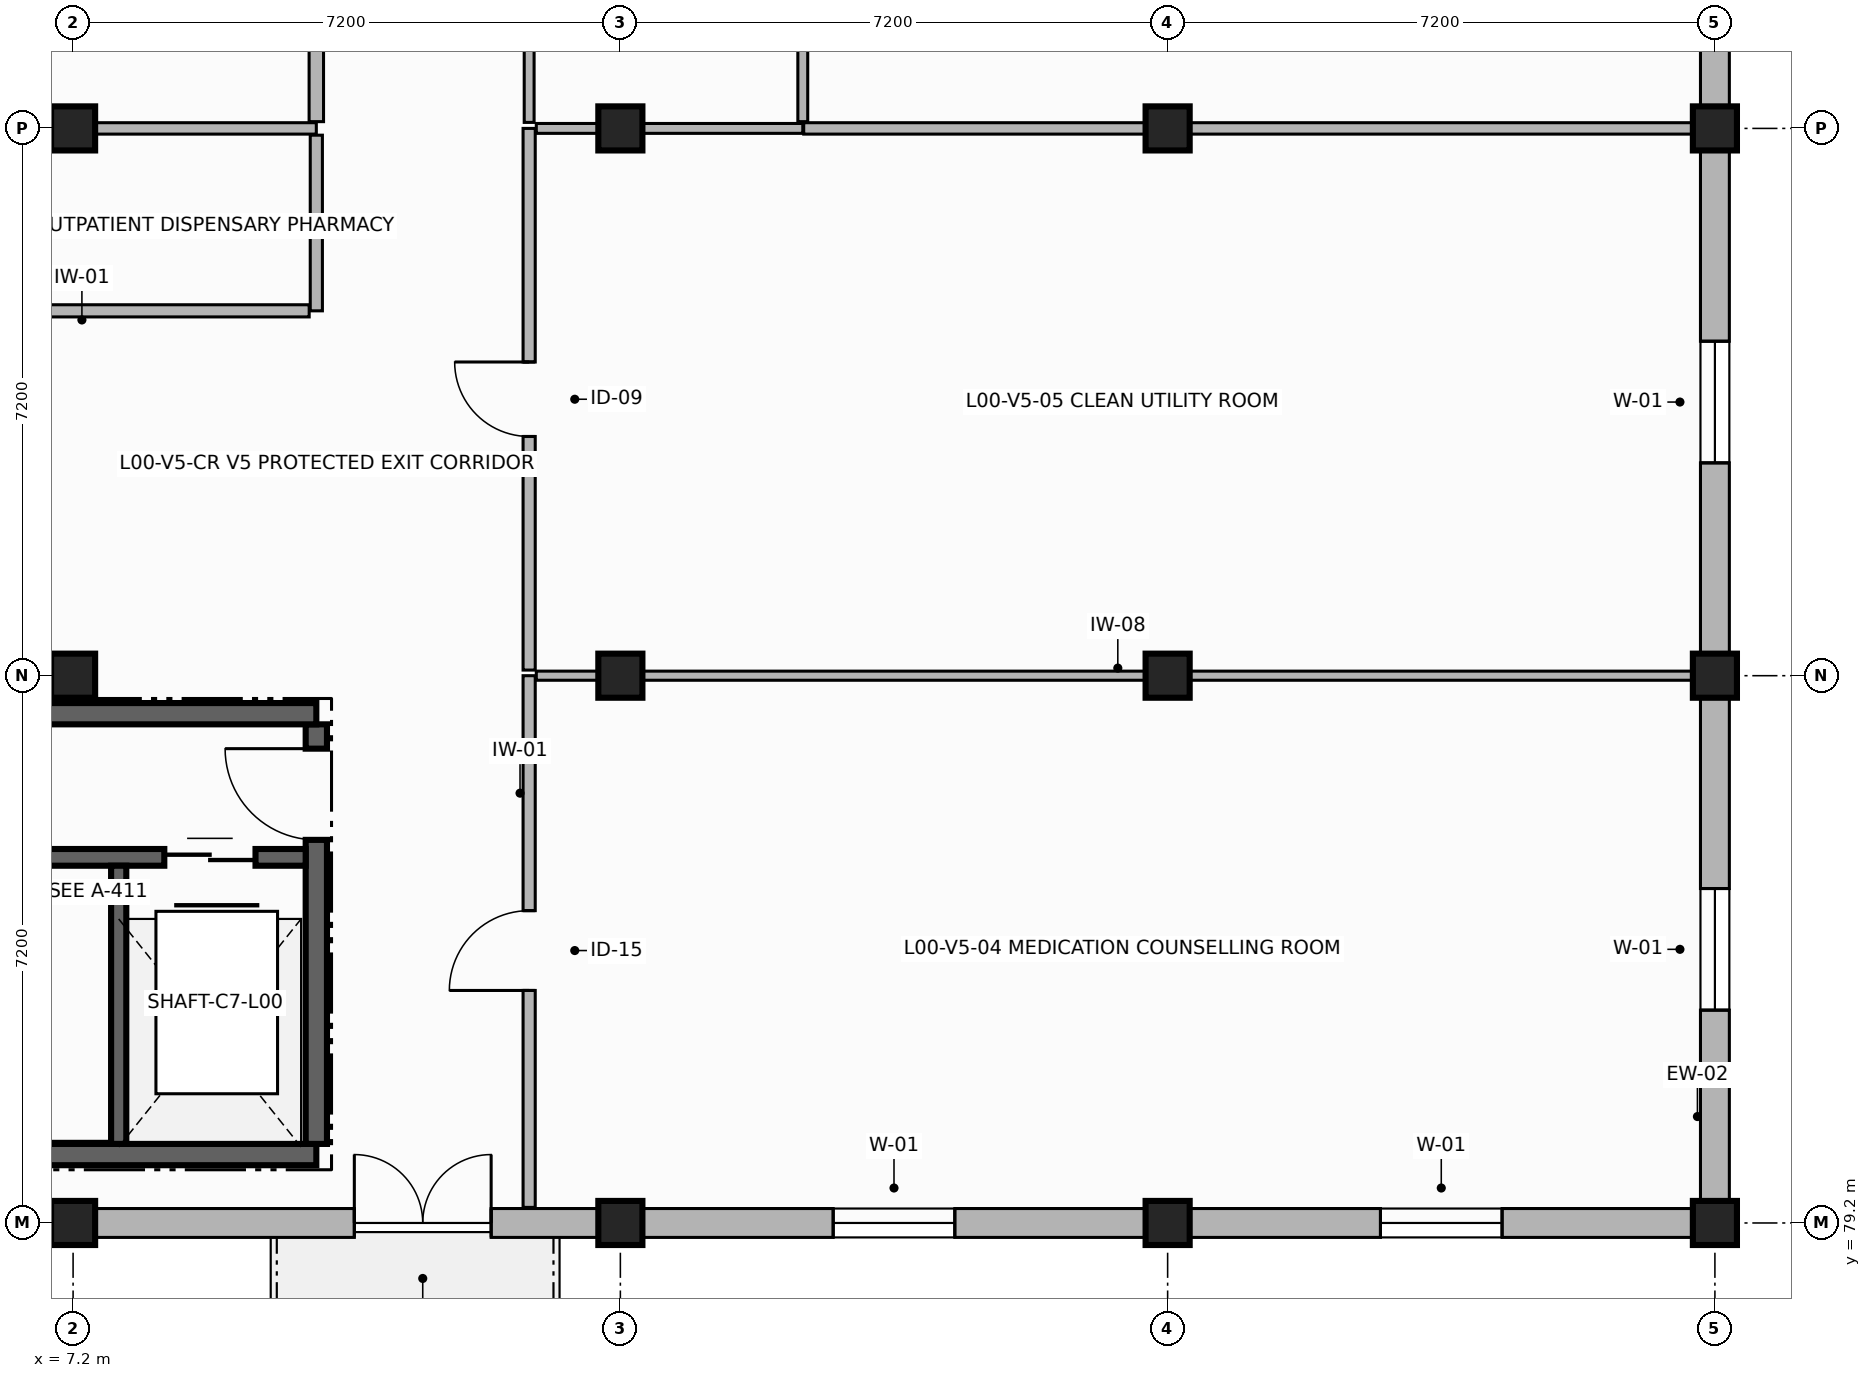
"""IFC4 building model, lengths in metres.
Left out: names, types, materials, properties, quantities, classifications, styles, units other than length and angle.
Written with IfcOpenShell. Run it as: python <this file> out.ifc"""

import sys

from ifc_helpers import new_model, si_unit, direction, frame, frame_2d, origin, origin_2d, place, context, subcontext, project, spatial, rectangle, extrude, element, fill, save


model = new_model("IFC4")
c1 = context("Model", 3, precision=1e-05, world=origin(), true_north=direction((0.0, 1.0)))
c2 = subcontext(c1, "Body", "Model", "MODEL_VIEW")
j1 = project(units=[si_unit("LENGTHUNIT", "METRE"), si_unit("PLANEANGLEUNIT", "RADIAN")], contexts=[c1])
p1 = place(None, origin())
s1 = spatial("IfcSite", under=j1, at=p1, CompositionType="ELEMENT")
p2 = place(p1, origin())
s2 = spatial("IfcBuilding", under=s1, at=p2, CompositionType="ELEMENT")
p3 = place(p2, origin())
s3 = spatial("IfcBuildingStorey", under=s2, at=p3, CompositionType="ELEMENT", Elevation=0.0)
for number, where, z_axis, x_axis in (
    (1, (7.2, 79.2, -0.38), (0.0, 0.0, 1.0), (1.0, 0.0, 0.0)),
    (2, (7.2, 86.4, -0.38), (0.0, 0.0, 1.0), (1.0, 0.0, 0.0)),
    (3, (7.2, 93.6, -0.38), (0.0, 0.0, 1.0), (1.0, 0.0, 0.0)),
    (4, (14.4, 79.2, -0.38), (0.0, 0.0, 1.0), (1.0, 0.0, 0.0)),
    (5, (14.4, 86.4, -0.38), (0.0, 0.0, 1.0), (1.0, 0.0, 0.0)),
    (6, (14.4, 93.6, -0.38), (0.0, 0.0, 1.0), (1.0, 0.0, 0.0)),
    (7, (21.6, 79.2, -0.38), (0.0, 0.0, 1.0), (1.0, 0.0, 0.0)),
    (8, (21.6, 86.4, -0.38), (0.0, 0.0, 1.0), (1.0, 0.0, 0.0)),
    (9, (21.6, 93.6, -0.38), (0.0, 0.0, 1.0), (1.0, 0.0, 0.0)),
    (10, (28.8, 79.2, -0.38), (0.0, 0.0, 1.0), (1.0, 0.0, 0.0)),
    (11, (28.8, 86.4, -0.38), (0.0, 0.0, 1.0), (1.0, 0.0, 0.0)),
    (12, (28.8, 93.6, -0.38), (0.0, 0.0, 1.0), (1.0, 0.0, 0.0)),
):
    element("IfcColumn", number, at=place(p3, frame(where, z_axis=z_axis, x_axis=x_axis)), inside=s3, PredefinedType="COLUMN", context=c2, shape_type="SweptSolid", body=[
        extrude(rectangle(XDim=0.58, YDim=0.58, at=origin_2d()), origin(), (0.0, 0.0, 1.0), 4.57),
    ])
p4 = place(p3, frame((0.0, 79.2, 0.0), z_axis=(0.0, 0.0, 1.0), x_axis=(1.0, 0.0, 0.0)))
e13 = element("IfcWall", 13, at=p4, inside=s3, PredefinedType="SOLIDWALL", context=c2, shape_type="SweptSolid", body=[
    extrude(rectangle(XDim=7.2, YDim=0.38, at=frame_2d((3.6, 0.0))), origin(), (0.0, 0.0, 1.0), 3.52),
])
p5 = place(p4, frame((2.8, 0.0, 0.85)))
e14 = element("IfcOpeningElement", 14, at=p5, cuts=e13, PredefinedType="OPENING", context=c2, shape_type="SweptSolid", body=[
    extrude(rectangle(XDim=1.6, YDim=2.45, at=frame_2d((0.8, 1.225))), frame((0.0, 0.2, 0.0), z_axis=(0.0, -1.0, 0.0), x_axis=(1.0, 0.0, 0.0)), (0.0, 0.0, 1.0), 0.4),
])
p6 = place(p3, frame((7.2, 79.2, 0.0), z_axis=(0.0, 0.0, 1.0), x_axis=(1.0, 0.0, 0.0)))
e15 = element("IfcWall", 15, at=p6, inside=s3, PredefinedType="SOLIDWALL", context=c2, shape_type="SweptSolid", body=[
    extrude(rectangle(XDim=7.2, YDim=0.38, at=frame_2d((3.6, 0.0))), origin(), (0.0, 0.0, 1.0), 3.52),
])
p7 = place(p6, frame((3.7, 0.0, 0.0)))
e16 = element("IfcOpeningElement", 16, at=p7, cuts=e15, PredefinedType="OPENING", context=c2, shape_type="SweptSolid", body=[
    extrude(rectangle(XDim=1.8, YDim=2.4, at=frame_2d((0.9, 1.2))), frame((0.0, 0.2, 0.0), z_axis=(0.0, -1.0, 0.0), x_axis=(1.0, 0.0, 0.0)), (0.0, 0.0, 1.0), 0.4),
])
p8 = place(p3, frame((14.4, 79.2, 0.0), z_axis=(0.0, 0.0, 1.0), x_axis=(1.0, 0.0, 0.0)))
e17 = element("IfcWall", 17, at=p8, inside=s3, PredefinedType="SOLIDWALL", context=c2, shape_type="SweptSolid", body=[
    extrude(rectangle(XDim=7.2, YDim=0.38, at=frame_2d((3.6, 0.0))), origin(), (0.0, 0.0, 1.0), 3.52),
])
p9 = place(p8, frame((2.8, 0.0, 0.85)))
e18 = element("IfcOpeningElement", 18, at=p9, cuts=e17, PredefinedType="OPENING", context=c2, shape_type="SweptSolid", body=[
    extrude(rectangle(XDim=1.6, YDim=2.45, at=frame_2d((0.8, 1.225))), frame((0.0, 0.2, 0.0), z_axis=(0.0, -1.0, 0.0), x_axis=(1.0, 0.0, 0.0)), (0.0, 0.0, 1.0), 0.4),
])
p10 = place(p3, frame((21.6, 79.2, 0.0), z_axis=(0.0, 0.0, 1.0), x_axis=(1.0, 0.0, 0.0)))
e19 = element("IfcWall", 19, at=p10, inside=s3, PredefinedType="SOLIDWALL", context=c2, shape_type="SweptSolid", body=[
    extrude(rectangle(XDim=7.2, YDim=0.38, at=frame_2d((3.6, 0.0))), origin(), (0.0, 0.0, 1.0), 3.52),
])
p11 = place(p10, frame((2.8, 0.0, 0.85)))
e20 = element("IfcOpeningElement", 20, at=p11, cuts=e19, PredefinedType="OPENING", context=c2, shape_type="SweptSolid", body=[
    extrude(rectangle(XDim=1.6, YDim=2.45, at=frame_2d((0.8, 1.225))), frame((0.0, 0.2, 0.0), z_axis=(0.0, -1.0, 0.0), x_axis=(1.0, 0.0, 0.0)), (0.0, 0.0, 1.0), 0.4),
])
p12 = place(p3, frame((28.8, 79.2, 0.0), z_axis=(0.0, 0.0, 1.0), x_axis=(0.0, 1.0, 0.0)))
e21 = element("IfcWall", 21, at=p12, inside=s3, PredefinedType="SOLIDWALL", context=c2, shape_type="SweptSolid", body=[
    extrude(rectangle(XDim=7.2, YDim=0.38, at=frame_2d((3.6, 0.0))), origin(), (0.0, 0.0, 1.0), 3.52),
])
p13 = place(p12, frame((2.8, 0.0, 0.85)))
e22 = element("IfcOpeningElement", 22, at=p13, cuts=e21, PredefinedType="OPENING", context=c2, shape_type="SweptSolid", body=[
    extrude(rectangle(XDim=1.6, YDim=2.45, at=frame_2d((0.8, 1.225))), frame((0.0, 0.2, 0.0), z_axis=(0.0, -1.0, 0.0), x_axis=(1.0, 0.0, 0.0)), (0.0, 0.0, 1.0), 0.4),
])
p14 = place(p3, frame((28.8, 86.4, 0.0), z_axis=(0.0, 0.0, 1.0), x_axis=(0.0, 1.0, 0.0)))
e23 = element("IfcWall", 23, at=p14, inside=s3, PredefinedType="SOLIDWALL", context=c2, shape_type="SweptSolid", body=[
    extrude(rectangle(XDim=7.2, YDim=0.38, at=frame_2d((3.6, 0.0))), origin(), (0.0, 0.0, 1.0), 3.52),
])
p15 = place(p14, frame((2.8, 0.0, 0.85)))
e24 = element("IfcOpeningElement", 24, at=p15, cuts=e23, PredefinedType="OPENING", context=c2, shape_type="SweptSolid", body=[
    extrude(rectangle(XDim=1.6, YDim=2.45, at=frame_2d((0.8, 1.225))), frame((0.0, 0.2, 0.0), z_axis=(0.0, -1.0, 0.0), x_axis=(1.0, 0.0, 0.0)), (0.0, 0.0, 1.0), 0.4),
])
p16 = place(p3, frame((28.8, 93.6, 0.0), z_axis=(0.0, 0.0, 1.0), x_axis=(0.0, 1.0, 0.0)))
e25 = element("IfcWall", 25, at=p16, inside=s3, PredefinedType="SOLIDWALL", context=c2, shape_type="SweptSolid", body=[
    extrude(rectangle(XDim=7.2, YDim=0.38, at=frame_2d((3.6, 0.0))), origin(), (0.0, 0.0, 1.0), 3.52),
])
p17 = place(p16, frame((2.8, 0.0, 0.85)))
e26 = element("IfcOpeningElement", 26, at=p17, cuts=e25, PredefinedType="OPENING", context=c2, shape_type="SweptSolid", body=[
    extrude(rectangle(XDim=1.6, YDim=2.45, at=frame_2d((0.8, 1.225))), frame((0.0, 0.2, 0.0), z_axis=(0.0, -1.0, 0.0), x_axis=(1.0, 0.0, 0.0)), (0.0, 0.0, 1.0), 0.4),
])
p18 = place(p3, frame((0.9, 80.1, 0.0), z_axis=(0.0, 0.0, 1.0), x_axis=(1.0, 0.0, 0.0)))
e27 = element("IfcWall", 27, at=p18, inside=s3, PredefinedType="SHEAR", context=c2, shape_type="SweptSolid", body=[
    extrude(rectangle(XDim=9.5, YDim=0.28, at=frame_2d((4.75, 0.0))), origin(), (0.0, 0.0, 1.0), 4.19),
])
p19 = place(p3, frame((10.4, 80.24, 0.0), z_axis=(0.0, 0.0, 1.0), x_axis=(0.0, 1.0, 0.0)))
e28 = element("IfcWall", 28, at=p19, inside=s3, PredefinedType="SHEAR", context=c2, shape_type="SweptSolid", body=[
    extrude(rectangle(XDim=5.52, YDim=0.28, at=frame_2d((2.76, 0.0))), origin(), (0.0, 0.0, 1.0), 4.19),
])
p20 = place(p19, frame((4.0, 0.0, 0.0)))
e29 = element("IfcOpeningElement", 29, at=p20, cuts=e28, PredefinedType="OPENING", context=c2, shape_type="SweptSolid", body=[
    extrude(rectangle(XDim=1.2, YDim=2.25, at=frame_2d((0.6, 1.125))), frame((0.0, 0.15, 0.0), z_axis=(0.0, -1.0, 0.0), x_axis=(1.0, 0.0, 0.0)), (0.0, 0.0, 1.0), 0.3),
])
p21 = place(p3, frame((10.4, 85.9, 0.0), z_axis=(0.0, 0.0, 1.0), x_axis=(-1.0, 0.0, 0.0)))
e30 = element("IfcWall", 30, at=p21, inside=s3, PredefinedType="SHEAR", context=c2, shape_type="SweptSolid", body=[
    extrude(rectangle(XDim=9.5, YDim=0.28, at=frame_2d((4.75, 0.0))), origin(), (0.0, 0.0, 1.0), 4.19),
])
p22 = place(p3, frame((1.04, 84.01, 0.0), z_axis=(0.0, 0.0, 1.0), x_axis=(1.0, 0.0, 0.0)))
e31 = element("IfcWall", 31, at=p22, inside=s3, PredefinedType="SHEAR", context=c2, shape_type="SweptSolid", body=[
    extrude(rectangle(XDim=9.22, YDim=0.22, at=frame_2d((4.61, 0.0))), origin(), (0.0, 0.0, 1.0), 4.19),
])
p23 = place(p22, frame((0.31, 0.0, 0.0)))
e32 = element("IfcOpeningElement", 32, at=p23, cuts=e31, PredefinedType="OPENING", context=c2, shape_type="SweptSolid", body=[
    extrude(rectangle(XDim=1.1, YDim=2.15, at=frame_2d((0.55, 1.075))), frame((0.0, 0.12, 0.0), z_axis=(0.0, -1.0, 0.0), x_axis=(1.0, 0.0, 0.0)), (0.0, 0.0, 1.0), 0.24),
])
p24 = place(p22, frame((7.36, 0.0, 0.0)))
e33 = element("IfcOpeningElement", 33, at=p24, cuts=e31, PredefinedType="OPENING", context=c2, shape_type="SweptSolid", body=[
    extrude(rectangle(XDim=1.2, YDim=2.2, at=frame_2d((0.6, 1.1))), frame((0.0, 0.12, 0.0), z_axis=(0.0, -1.0, 0.0), x_axis=(1.0, 0.0, 0.0)), (0.0, 0.0, 1.0), 0.24),
])
p25 = place(p3, frame((7.8, 80.24, 0.0), z_axis=(0.0, 0.0, 1.0), x_axis=(0.0, 1.0, 0.0)))
e34 = element("IfcWall", 34, at=p25, inside=s3, PredefinedType="SHEAR", context=c2, shape_type="SweptSolid", body=[
    extrude(rectangle(XDim=3.66, YDim=0.2, at=frame_2d((1.83, 0.0))), origin(), (0.0, 0.0, 1.0), 4.19),
])
p26 = place(p3, frame((0.205, 93.6, 0.0), z_axis=(0.0, 0.0, 1.0), x_axis=(1.0, 0.0, 0.0)))
e35 = element("IfcWall", 35, at=p26, inside=s3, PredefinedType="PARTITIONING", context=c2, shape_type="SweptSolid", body=[
    extrude(rectangle(XDim=10.195, YDim=0.15, at=frame_2d((5.097, 0.0))), origin(), (0.0, 0.0, 1.0), 3.5),
])
p27 = place(p3, frame((10.4, 93.511, 0.0), z_axis=(0.0, 0.0, 1.0), x_axis=(0.0, -1.0, 0.0)))
e36 = element("IfcWall", 36, at=p27, inside=s3, PredefinedType="PARTITIONING", context=c2, shape_type="SweptSolid", body=[
    extrude(rectangle(XDim=2.311, YDim=0.16, at=frame_2d((1.156, 0.0))), origin(), (0.0, 0.0, 1.0), 3.5),
])
p28 = place(p3, frame((10.306, 91.2, 0.0), z_axis=(0.0, 0.0, 1.0), x_axis=(-1.0, 0.0, 0.0)))
e37 = element("IfcWall", 37, at=p28, inside=s3, PredefinedType="PARTITIONING", context=c2, shape_type="SweptSolid", body=[
    extrude(rectangle(XDim=10.101, YDim=0.16, at=frame_2d((5.05, 0.0))), origin(), (0.0, 0.0, 1.0), 3.5),
])
p29 = place(p28, frame((5.98, 0.0, 0.0)))
e38 = element("IfcOpeningElement", 38, at=p29, cuts=e37, PredefinedType="OPENING", context=c2, shape_type="SweptSolid", body=[
    extrude(rectangle(XDim=1.25, YDim=2.2, at=frame_2d((0.625, 1.1))), frame((0.0, 0.09, 0.0), z_axis=(0.0, -1.0, 0.0), x_axis=(1.0, 0.0, 0.0)), (0.0, 0.0, 1.0), 0.18),
])
p30 = place(p3, frame((10.4, 101.145, 0.0), z_axis=(0.0, 0.0, 1.0), x_axis=(0.0, -1.0, 0.0)))
e39 = element("IfcWall", 39, at=p30, inside=s3, PredefinedType="PARTITIONING", context=c2, shape_type="SweptSolid", body=[
    extrude(rectangle(XDim=7.456, YDim=0.19, at=frame_2d((3.728, 0.0))), origin(), (0.0, 0.0, 1.0), 3.5),
])
p31 = place(p30, frame((3.341, 0.0, 0.0)))
e40 = element("IfcOpeningElement", 40, at=p31, cuts=e39, PredefinedType="OPENING", context=c2, shape_type="SweptSolid", body=[
    extrude(rectangle(XDim=1.25, YDim=2.2, at=frame_2d((0.625, 1.1))), frame((0.0, 0.105, 0.0), z_axis=(0.0, -1.0, 0.0), x_axis=(1.0, 0.0, 0.0)), (0.0, 0.0, 1.0), 0.21),
])
p32 = place(p3, frame((13.2, 79.405, 0.0), z_axis=(0.0, 0.0, 1.0), x_axis=(0.0, 1.0, 0.0)))
e41 = element("IfcWall", 41, at=p32, inside=s3, PredefinedType="PARTITIONING", context=c2, shape_type="SweptSolid", body=[
    extrude(rectangle(XDim=6.995, YDim=0.16, at=frame_2d((3.498, 0.0))), origin(), (0.0, 0.0, 1.0), 3.5),
])
p33 = place(p32, frame((2.854, 0.0, 0.0)))
e42 = element("IfcOpeningElement", 42, at=p33, cuts=e41, PredefinedType="OPENING", context=c2, shape_type="SweptSolid", body=[
    extrude(rectangle(XDim=1.05, YDim=2.2, at=frame_2d((0.525, 1.1))), frame((0.0, 0.09, 0.0), z_axis=(0.0, -1.0, 0.0), x_axis=(1.0, 0.0, 0.0)), (0.0, 0.0, 1.0), 0.18),
])
p34 = place(p3, frame((13.294, 86.4, 0.0), z_axis=(0.0, 0.0, 1.0), x_axis=(1.0, 0.0, 0.0)))
e43 = element("IfcWall", 43, at=p34, inside=s3, PredefinedType="PARTITIONING", context=c2, shape_type="SweptSolid", body=[
    extrude(rectangle(XDim=15.301, YDim=0.12, at=frame_2d((7.65, 0.0))), origin(), (0.0, 0.0, 1.0), 3.5),
])
p35 = place(p3, frame((13.2, 86.474, 0.0), z_axis=(0.0, 0.0, 1.0), x_axis=(0.0, 1.0, 0.0)))
e44 = element("IfcWall", 44, at=p35, inside=s3, PredefinedType="PARTITIONING", context=c2, shape_type="SweptSolid", body=[
    extrude(rectangle(XDim=7.126, YDim=0.16, at=frame_2d((3.563, 0.0))), origin(), (0.0, 0.0, 1.0), 3.5),
])
p36 = place(p35, frame((3.073, 0.0, 0.0)))
e45 = element("IfcOpeningElement", 45, at=p36, cuts=e44, PredefinedType="OPENING", context=c2, shape_type="SweptSolid", body=[
    extrude(rectangle(XDim=0.98, YDim=2.15, at=frame_2d((0.49, 1.075))), frame((0.0, 0.09, 0.0), z_axis=(0.0, -1.0, 0.0), x_axis=(1.0, 0.0, 0.0)), (0.0, 0.0, 1.0), 0.18),
])
p37 = place(p3, frame((13.294, 93.6, 0.0), z_axis=(0.0, 0.0, 1.0), x_axis=(1.0, 0.0, 0.0)))
e46 = element("IfcWall", 46, at=p37, inside=s3, PredefinedType="PARTITIONING", context=c2, shape_type="SweptSolid", body=[
    extrude(rectangle(XDim=3.506, YDim=0.13, at=frame_2d((1.753, 0.0))), origin(), (0.0, 0.0, 1.0), 3.5),
])
p38 = place(p3, frame((16.812, 93.6, 0.0), z_axis=(0.0, 0.0, 1.0), x_axis=(1.0, 0.0, 0.0)))
e47 = element("IfcWall", 47, at=p38, inside=s3, PredefinedType="PARTITIONING", context=c2, shape_type="SweptSolid", body=[
    extrude(rectangle(XDim=11.783, YDim=0.15, at=frame_2d((5.892, 0.0))), origin(), (0.0, 0.0, 1.0), 3.5),
])
p39 = place(p3, frame((16.8, 98.121, 0.0), z_axis=(0.0, 0.0, 1.0), x_axis=(0.0, -1.0, 0.0)))
e48 = element("IfcWall", 48, at=p39, inside=s3, PredefinedType="PARTITIONING", context=c2, shape_type="SweptSolid", body=[
    extrude(rectangle(XDim=4.432, YDim=0.13, at=frame_2d((2.216, 0.0))), origin(), (0.0, 0.0, 1.0), 3.5),
])
p40 = place(p3, frame((13.2, 93.679, 0.0), z_axis=(0.0, 0.0, 1.0), x_axis=(0.0, 1.0, 0.0)))
e49 = element("IfcWall", 49, at=p40, inside=s3, PredefinedType="PARTITIONING", context=c2, shape_type="SweptSolid", body=[
    extrude(rectangle(XDim=4.442, YDim=0.13, at=frame_2d((2.221, 0.0))), origin(), (0.0, 0.0, 1.0), 3.5),
])
p41 = place(p40, frame((3.012, 0.0, 0.0)))
e50 = element("IfcOpeningElement", 50, at=p41, cuts=e49, PredefinedType="OPENING", context=c2, shape_type="SweptSolid", body=[
    extrude(rectangle(XDim=0.95, YDim=2.1, at=frame_2d((0.475, 1.05))), frame((0.0, 0.075, 0.0), z_axis=(0.0, -1.0, 0.0), x_axis=(1.0, 0.0, 0.0)), (0.0, 0.0, 1.0), 0.15),
])
p42 = place(p7, origin())
e51 = element("IfcDoor", 51, at=p42, inside=s3, OperationType="DOUBLE_DOOR_SINGLE_SWING", PredefinedType="DOOR", context=c2, shape_type="SweptSolid", body=[
    extrude(rectangle(XDim=1.8, YDim=2.4, at=frame_2d((0.9, 1.2))), frame((0.0, 0.025, 0.0), z_axis=(0.0, -1.0, 0.0), x_axis=(1.0, 0.0, 0.0)), (0.0, 0.0, 1.0), 0.05),
])
fill(e16, e51)
p43 = place(p9, origin())
e52 = element("IfcWindow", 52, at=p43, inside=s3, PartitioningType="SINGLE_PANEL", PredefinedType="WINDOW", context=c2, shape_type="SweptSolid", body=[
    extrude(rectangle(XDim=1.6, YDim=2.45, at=frame_2d((0.8, 1.225))), frame((0.0, 0.03, 0.0), z_axis=(0.0, -1.0, 0.0), x_axis=(1.0, 0.0, 0.0)), (0.0, 0.0, 1.0), 0.06),
])
fill(e18, e52)
p44 = place(p11, origin())
e53 = element("IfcWindow", 53, at=p44, inside=s3, PartitioningType="SINGLE_PANEL", PredefinedType="WINDOW", context=c2, shape_type="SweptSolid", body=[
    extrude(rectangle(XDim=1.6, YDim=2.45, at=frame_2d((0.8, 1.225))), frame((0.0, 0.03, 0.0), z_axis=(0.0, -1.0, 0.0), x_axis=(1.0, 0.0, 0.0)), (0.0, 0.0, 1.0), 0.06),
])
fill(e20, e53)
p45 = place(p13, origin())
e54 = element("IfcWindow", 54, at=p45, inside=s3, PartitioningType="SINGLE_PANEL", PredefinedType="WINDOW", context=c2, shape_type="SweptSolid", body=[
    extrude(rectangle(XDim=1.6, YDim=2.45, at=frame_2d((0.8, 1.225))), frame((0.0, 0.03, 0.0), z_axis=(0.0, -1.0, 0.0), x_axis=(1.0, 0.0, 0.0)), (0.0, 0.0, 1.0), 0.06),
])
fill(e22, e54)
p46 = place(p15, origin())
e55 = element("IfcWindow", 55, at=p46, inside=s3, PartitioningType="SINGLE_PANEL", PredefinedType="WINDOW", context=c2, shape_type="SweptSolid", body=[
    extrude(rectangle(XDim=1.6, YDim=2.45, at=frame_2d((0.8, 1.225))), frame((0.0, 0.03, 0.0), z_axis=(0.0, -1.0, 0.0), x_axis=(1.0, 0.0, 0.0)), (0.0, 0.0, 1.0), 0.06),
])
fill(e24, e55)
p47 = place(p24, origin())
e56 = element("IfcDoor", 56, at=p47, inside=s3, OperationType="DOUBLE_DOOR_SLIDING", PredefinedType="DOOR", context=c2, shape_type="SweptSolid", body=[
    extrude(rectangle(XDim=1.2, YDim=2.2, at=frame_2d((0.6, 1.1))), frame((0.0, 0.025, 0.0), z_axis=(0.0, -1.0, 0.0), x_axis=(1.0, 0.0, 0.0)), (0.0, 0.0, 1.0), 0.05),
])
fill(e33, e56)
p48 = place(p20, origin())
e57 = element("IfcDoor", 57, at=p48, inside=s3, OperationType="SINGLE_SWING_RIGHT", PredefinedType="DOOR", context=c2, shape_type="SweptSolid", body=[
    extrude(rectangle(XDim=1.2, YDim=2.25, at=frame_2d((0.6, 1.125))), frame((0.0, 0.025, 0.0), z_axis=(0.0, -1.0, 0.0), x_axis=(1.0, 0.0, 0.0)), (0.0, 0.0, 1.0), 0.05),
])
fill(e29, e57)
p49 = place(p33, origin())
e58 = element("IfcDoor", 58, at=p49, inside=s3, OperationType="SINGLE_SWING_LEFT", PredefinedType="DOOR", context=c2, shape_type="SweptSolid", body=[
    extrude(rectangle(XDim=1.05, YDim=2.2, at=frame_2d((0.525, 1.1))), frame((0.0, 0.025, 0.0), z_axis=(0.0, -1.0, 0.0), x_axis=(1.0, 0.0, 0.0)), (0.0, 0.0, 1.0), 0.05),
])
fill(e42, e58)
p50 = place(p36, origin())
e59 = element("IfcDoor", 59, at=p50, inside=s3, OperationType="SINGLE_SWING_RIGHT", PredefinedType="DOOR", context=c2, shape_type="SweptSolid", body=[
    extrude(rectangle(XDim=0.98, YDim=2.15, at=frame_2d((0.49, 1.075))), frame((0.0, 0.025, 0.0), z_axis=(0.0, -1.0, 0.0), x_axis=(1.0, 0.0, 0.0)), (0.0, 0.0, 1.0), 0.05),
])
fill(e45, e59)
save(model, sys.argv[1])
